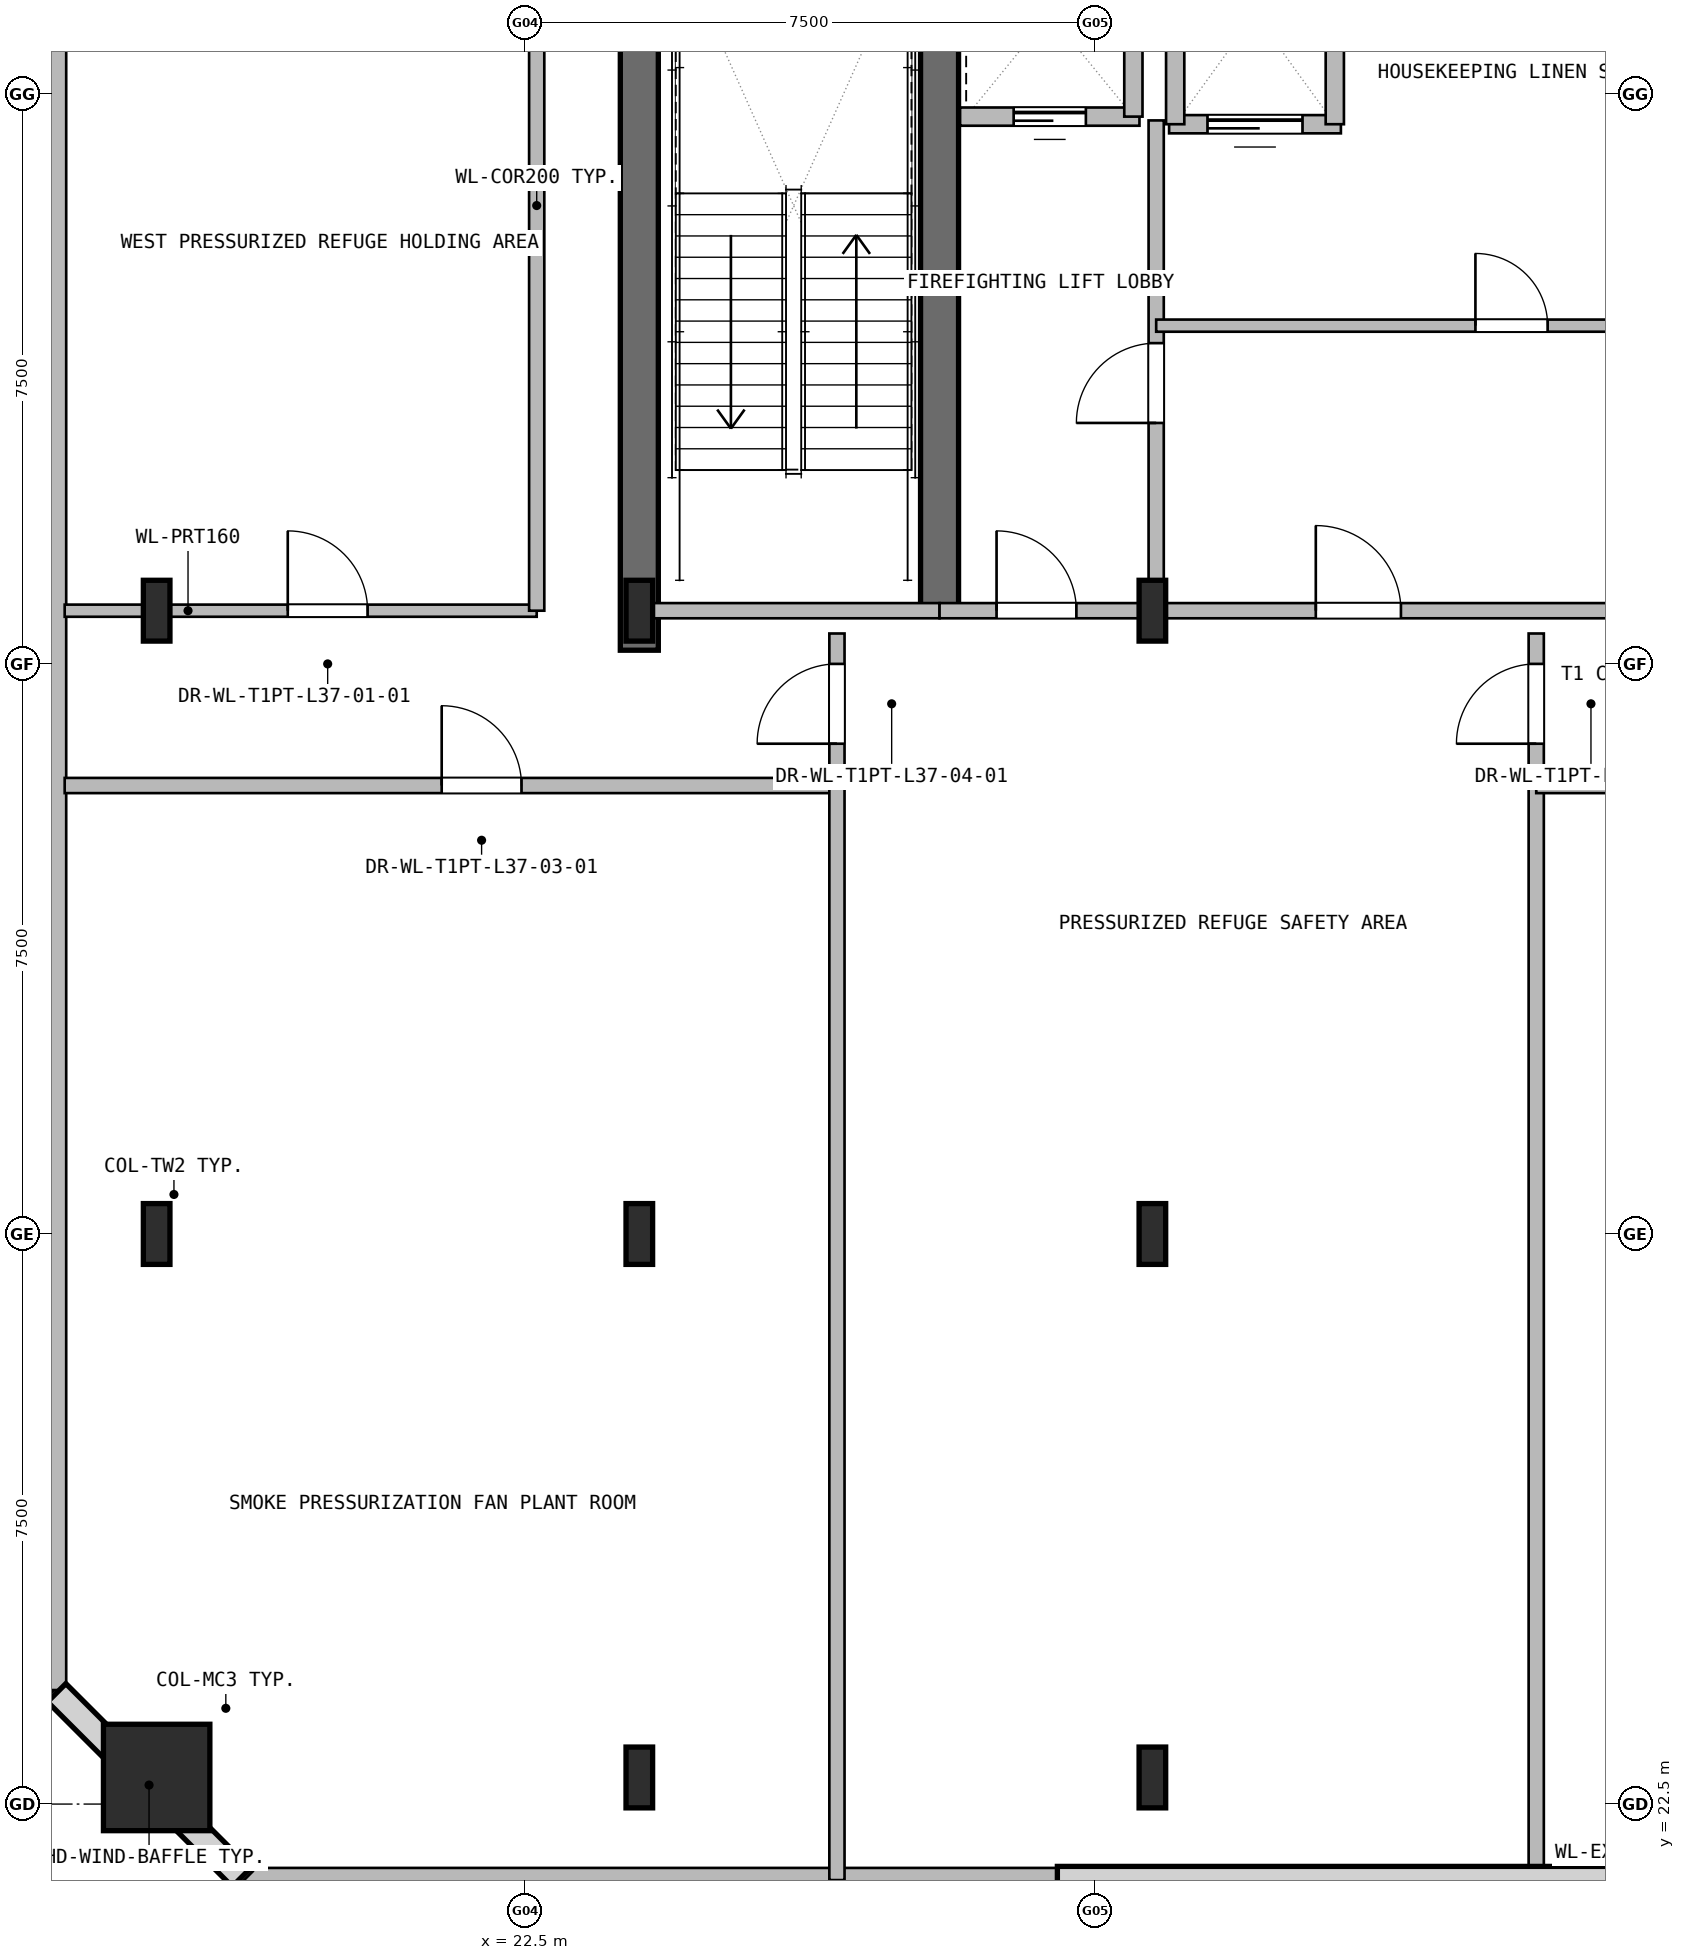
"""IFC4 building model, lengths in metres.
Left out: names, types, materials, properties, quantities, classifications, styles, units other than length and angle.
Written with IfcOpenShell. Run it as: python <this file> out.ifc"""

import sys

from ifc_helpers import new_model, si_unit, direction, frame, frame_2d, origin, origin_2d, place, context, subcontext, project, spatial, rectangle, hollow_rectangle, i_section, extrude, element, fill, save


model = new_model("IFC4")
c1 = context("Model", 3, precision=1e-05, world=origin(), true_north=direction((0.0, 1.0)))
c2 = subcontext(c1, "Body", "Model", "MODEL_VIEW")
j1 = project(units=[si_unit("LENGTHUNIT", "METRE"), si_unit("PLANEANGLEUNIT", "RADIAN")], contexts=[c1])
p1 = place(None, origin())
s1 = spatial("IfcSite", under=j1, at=p1, CompositionType="ELEMENT")
p2 = place(p1, origin())
s2 = spatial("IfcBuilding", under=s1, at=p2, CompositionType="ELEMENT")
p3 = place(p2, frame((0.0, 0.0, 138.0)))
s3 = spatial("IfcBuildingStorey", under=s2, at=p3, CompositionType="ELEMENT", Elevation=138.0)
p4 = place(p3, frame((24.0, 37.68, 0.0), z_axis=(0.0, 0.0, 1.0), x_axis=(0.0, 1.0, 0.0)))
e1 = element("IfcWall", 1, at=p4, inside=s3, PredefinedType="SHEAR", context=c2, shape_type="SweptSolid", body=[
    extrude(rectangle(XDim=10.32, YDim=0.5, at=frame_2d((5.16, 0.0))), origin(), (0.0, 0.0, 1.0), 4.8),
])
p5 = place(p3, frame((27.95, 38.2, 0.0), z_axis=(0.0, 0.0, 1.0), x_axis=(0.0, 1.0, 0.0)))
e2 = element("IfcWall", 2, at=p5, inside=s3, PredefinedType="SHEAR", context=c2, shape_type="SweptSolid", body=[
    extrude(rectangle(XDim=9.8, YDim=0.5, at=frame_2d((4.9, 0.0))), origin(), (0.0, 0.0, 1.0), 4.8),
])
p6 = place(p3, frame((17.65, 22.85, 0.0), z_axis=(0.0, 0.0, 1.0), x_axis=(1.0, 0.0, 0.0)))
e3 = element("IfcColumn", 3, at=p6, inside=s3, PredefinedType="COLUMN", context=c2, shape_type="SweptSolid", body=[
    extrude(hollow_rectangle(XDim=1.4, YDim=1.4, WallThickness=0.036, at=origin_2d()), origin(), (0.0, 0.0, 1.0), 4.8),
])
for number, where, z_axis, x_axis in (
    (4, (17.65, 30.0, 0.0), (0.0, 0.0, 1.0), (1.0, 0.0, 0.0)),
    (5, (17.65, 38.2, 0.0), (0.0, 0.0, 1.0), (1.0, 0.0, 0.0)),
    (6, (24.0, 22.85, 0.0), (0.0, 0.0, 1.0), (1.0, 0.0, 0.0)),
    (7, (24.0, 30.0, 0.0), (0.0, 0.0, 1.0), (1.0, 0.0, 0.0)),
    (8, (24.0, 38.2, 0.0), (0.0, 0.0, 1.0), (1.0, 0.0, 0.0)),
    (9, (30.75, 22.85, 0.0), (0.0, 0.0, 1.0), (1.0, 0.0, 0.0)),
    (10, (30.75, 30.0, 0.0), (0.0, 0.0, 1.0), (1.0, 0.0, 0.0)),
    (11, (30.75, 38.2, 0.0), (0.0, 0.0, 1.0), (1.0, 0.0, 0.0)),
):
    element("IfcColumn", number, at=place(p3, frame(where, z_axis=z_axis, x_axis=x_axis)), inside=s3, PredefinedType="COLUMN", context=c2, shape_type="SweptSolid", body=[
        extrude(i_section(OverallWidth=0.35, OverallDepth=0.8, WebThickness=0.018, FlangeThickness=0.032, at=origin_2d()), origin(), (0.0, 0.0, 1.0), 4.8),
    ])
p7 = place(p3, frame((56.2, 21.5, 0.0), z_axis=(0.0, 0.0, 1.0), x_axis=(-1.0, 0.0, 0.0)))
e12 = element("IfcWall", 12, at=p7, inside=s3, PredefinedType="SOLIDWALL", context=c2, shape_type="SweptSolid", body=[
    extrude(rectangle(XDim=37.4, YDim=0.32, at=frame_2d((18.7, 0.0))), origin(), (0.0, 0.0, 1.0), 4.53),
])
p8 = place(p3, frame((18.8, 21.5, 0.0), z_axis=(0.0, 0.0, 1.0), x_axis=(-0.707106781187, 0.707106781187, 0.0)))
e13 = element("IfcWall", 13, at=p8, inside=s3, PredefinedType="SOLIDWALL", context=c2, shape_type="SweptSolid", body=[
    extrude(rectangle(XDim=3.536, YDim=0.32, at=frame_2d((1.768, 0.0))), origin(), (0.0, 0.0, 1.0), 4.53),
])
p9 = place(p3, frame((16.3, 24.0, 0.0), z_axis=(0.0, 0.0, 1.0), x_axis=(0.0, 1.0, 0.0)))
e14 = element("IfcWall", 14, at=p9, inside=s3, PredefinedType="SOLIDWALL", context=c2, shape_type="SweptSolid", body=[
    extrude(rectangle(XDim=22.5, YDim=0.32, at=frame_2d((11.25, 0.0))), origin(), (0.0, 0.0, 1.0), 4.53),
])
p10 = place(p3, frame((24.0, 38.2, 0.0), z_axis=(0.0, 0.0, 1.0), x_axis=(1.0, 0.0, 0.0)))
e15 = element("IfcWall", 15, at=p10, inside=s3, PredefinedType="PARTITIONING", context=c2, shape_type="SweptSolid", body=[
    extrude(rectangle(XDim=3.95, YDim=0.2, at=frame_2d((1.975, 0.0))), origin(), (0.0, 0.0, 1.0), 3.88),
])
p11 = place(p3, frame((30.8, 38.2, 0.0), z_axis=(0.0, 0.0, 1.0), x_axis=(0.0, 1.0, 0.0)))
e16 = element("IfcWall", 16, at=p11, inside=s3, PredefinedType="PARTITIONING", context=c2, shape_type="SweptSolid", body=[
    extrude(rectangle(XDim=6.45, YDim=0.2, at=frame_2d((3.225, 0.0))), origin(), (0.0, 0.0, 1.0), 3.88),
])
p12 = place(p11, frame((2.47, 0.0, 0.0)))
e17 = element("IfcOpeningElement", 17, at=p12, cuts=e16, PredefinedType="OPENING", context=c2, shape_type="SweptSolid", body=[
    extrude(rectangle(XDim=1.05, YDim=2.1, at=frame_2d((0.525, 1.05))), frame((0.0, 0.11, 0.0), z_axis=(0.0, -1.0, 0.0), x_axis=(1.0, 0.0, 0.0)), (0.0, 0.0, 1.0), 0.22),
])
p13 = place(p3, frame((27.95, 38.2, 0.0), z_axis=(0.0, 0.0, 1.0), x_axis=(1.0, 0.0, 0.0)))
e18 = element("IfcWall", 18, at=p13, inside=s3, PredefinedType="PARTITIONING", context=c2, shape_type="SweptSolid", body=[
    extrude(rectangle(XDim=2.85, YDim=0.2, at=frame_2d((1.425, 0.0))), origin(), (0.0, 0.0, 1.0), 3.88),
])
p14 = place(p13, frame((0.75, 0.0, 0.0)))
e19 = element("IfcOpeningElement", 19, at=p14, cuts=e18, PredefinedType="OPENING", context=c2, shape_type="SweptSolid", body=[
    extrude(rectangle(XDim=1.05, YDim=2.1, at=frame_2d((0.525, 1.05))), frame((0.0, 0.11, 0.0), z_axis=(0.0, -1.0, 0.0), x_axis=(1.0, 0.0, 0.0)), (0.0, 0.0, 1.0), 0.22),
])
p15 = place(p3, frame((30.8, 38.2, 0.0), z_axis=(0.0, 0.0, 1.0), x_axis=(1.0, 0.0, 0.0)))
e20 = element("IfcWall", 20, at=p15, inside=s3, PredefinedType="PARTITIONING", context=c2, shape_type="SweptSolid", body=[
    extrude(rectangle(XDim=16.35, YDim=0.2, at=frame_2d((8.175, 0.0))), origin(), (0.0, 0.0, 1.0), 3.88),
])
p16 = place(p15, frame((2.1, 0.0, 0.0)))
e21 = element("IfcOpeningElement", 21, at=p16, cuts=e20, PredefinedType="OPENING", context=c2, shape_type="SweptSolid", body=[
    extrude(rectangle(XDim=1.12, YDim=2.1, at=frame_2d((0.56, 1.05))), frame((0.0, 0.11, 0.0), z_axis=(0.0, -1.0, 0.0), x_axis=(1.0, 0.0, 0.0)), (0.0, 0.0, 1.0), 0.22),
])
p17 = place(p15, frame((7.95, 0.0, 0.0)))
e22 = element("IfcOpeningElement", 22, at=p17, cuts=e20, PredefinedType="OPENING", context=c2, shape_type="SweptSolid", body=[
    extrude(rectangle(XDim=1.12, YDim=2.1, at=frame_2d((0.56, 1.05))), frame((0.0, 0.11, 0.0), z_axis=(0.0, -1.0, 0.0), x_axis=(1.0, 0.0, 0.0)), (0.0, 0.0, 1.0), 0.22),
])
p18 = place(p3, frame((28.22, 44.7, 0.0), z_axis=(0.0, 0.0, 1.0), x_axis=(1.0, 0.0, 0.0)))
e23 = element("IfcWall", 23, at=p18, inside=s3, PredefinedType="PARTITIONING", context=c2, shape_type="SweptSolid", body=[
    extrude(rectangle(XDim=2.36, YDim=0.24, at=frame_2d((1.18, 0.0))), origin(), (0.0, 0.0, 1.0), 4.53),
])
p19 = place(p18, frame((0.705, 0.0, 0.0)))
e24 = element("IfcOpeningElement", 24, at=p19, cuts=e23, PredefinedType="OPENING", context=c2, shape_type="SweptSolid", body=[
    extrude(rectangle(XDim=0.95, YDim=2.15, at=frame_2d((0.475, 1.075))), frame((0.0, 0.13, 0.0), z_axis=(0.0, -1.0, 0.0), x_axis=(1.0, 0.0, 0.0)), (0.0, 0.0, 1.0), 0.26),
])
p20 = place(p3, frame((30.5, 44.7, 0.0), z_axis=(0.0, 0.0, 1.0), x_axis=(0.0, 1.0, 0.0)))
e25 = element("IfcWall", 25, at=p20, inside=s3, PredefinedType="PARTITIONING", context=c2, shape_type="SweptSolid", body=[
    extrude(rectangle(XDim=2.7, YDim=0.24, at=frame_2d((1.35, 0.0))), origin(), (0.0, 0.0, 1.0), 3.88),
])
p21 = place(p3, frame((30.97, 44.6, 0.0), z_axis=(0.0, 0.0, 1.0), x_axis=(1.0, 0.0, 0.0)))
e26 = element("IfcWall", 26, at=p21, inside=s3, PredefinedType="PARTITIONING", context=c2, shape_type="SweptSolid", body=[
    extrude(rectangle(XDim=2.26, YDim=0.24, at=frame_2d((1.13, 0.0))), origin(), (0.0, 0.0, 1.0), 4.53),
])
p22 = place(p21, frame((0.505, 0.0, 0.0)))
e27 = element("IfcOpeningElement", 27, at=p22, cuts=e26, PredefinedType="OPENING", context=c2, shape_type="SweptSolid", body=[
    extrude(rectangle(XDim=1.25, YDim=2.2, at=frame_2d((0.625, 1.1))), frame((0.0, 0.13, 0.0), z_axis=(0.0, -1.0, 0.0), x_axis=(1.0, 0.0, 0.0)), (0.0, 0.0, 1.0), 0.26),
])
for number, where, z_axis, x_axis in (
    (28, (31.05, 44.6, 0.0), (0.0, 0.0, 1.0), (0.0, 1.0, 0.0)),
    (29, (33.15, 44.6, 0.0), (0.0, 0.0, 1.0), (0.0, 1.0, 0.0)),
):
    element("IfcWall", number, at=place(p3, frame(where, z_axis=z_axis, x_axis=x_axis)), inside=s3, PredefinedType="PARTITIONING", context=c2, shape_type="SweptSolid", body=[
        extrude(rectangle(XDim=2.9, YDim=0.24, at=frame_2d((1.45, 0.0))), origin(), (0.0, 0.0, 1.0), 4.53),
    ])
p23 = place(p3, frame((30.8, 41.95, 0.0), z_axis=(0.0, 0.0, 1.0), x_axis=(1.0, 0.0, 0.0)))
e30 = element("IfcWall", 30, at=p23, inside=s3, PredefinedType="PARTITIONING", context=c2, shape_type="SweptSolid", body=[
    extrude(rectangle(XDim=6.95, YDim=0.16, at=frame_2d((3.475, 0.0))), origin(), (0.0, 0.0, 1.0), 4.53),
])
p24 = place(p23, frame((4.2, 0.0, 0.0)))
e31 = element("IfcOpeningElement", 31, at=p24, cuts=e30, PredefinedType="OPENING", context=c2, shape_type="SweptSolid", body=[
    extrude(rectangle(XDim=0.95, YDim=2.1, at=frame_2d((0.475, 1.05))), frame((0.0, 0.09, 0.0), z_axis=(0.0, -1.0, 0.0), x_axis=(1.0, 0.0, 0.0)), (0.0, 0.0, 1.0), 0.18),
])
p25 = place(p3, frame((16.44, 38.2, 0.0), z_axis=(0.0, 0.0, 1.0), x_axis=(1.0, 0.0, 0.0)))
e32 = element("IfcWall", 32, at=p25, inside=s3, PredefinedType="PARTITIONING", context=c2, shape_type="SweptSolid", body=[
    extrude(rectangle(XDim=6.21, YDim=0.16, at=frame_2d((3.105, 0.0))), origin(), (0.0, 0.0, 1.0), 3.88),
])
p26 = place(p25, frame((2.935, 0.0, 0.0)))
e33 = element("IfcOpeningElement", 33, at=p26, cuts=e32, PredefinedType="OPENING", context=c2, shape_type="SweptSolid", body=[
    extrude(rectangle(XDim=1.05, YDim=2.1, at=frame_2d((0.525, 1.05))), frame((0.0, 0.09, 0.0), z_axis=(0.0, -1.0, 0.0), x_axis=(1.0, 0.0, 0.0)), (0.0, 0.0, 1.0), 0.18),
])
p27 = place(p3, frame((22.65, 38.2, 0.0), z_axis=(0.0, 0.0, 1.0), x_axis=(0.0, 1.0, 0.0)))
e34 = element("IfcWall", 34, at=p27, inside=s3, PredefinedType="PARTITIONING", context=c2, shape_type="SweptSolid", body=[
    extrude(rectangle(XDim=10.66, YDim=0.2, at=frame_2d((5.33, 0.0))), origin(), (0.0, 0.0, 1.0), 4.53),
])
p28 = place(p3, frame((16.44, 35.9, 0.0), z_axis=(0.0, 0.0, 1.0), x_axis=(1.0, 0.0, 0.0)))
e35 = element("IfcWall", 35, at=p28, inside=s3, PredefinedType="PARTITIONING", context=c2, shape_type="SweptSolid", body=[
    extrude(rectangle(XDim=10.16, YDim=0.2, at=frame_2d((5.08, 0.0))), origin(), (0.0, 0.0, 1.0), 4.53),
])
p29 = place(p28, frame((4.96, 0.0, 0.0)))
e36 = element("IfcOpeningElement", 36, at=p29, cuts=e35, PredefinedType="OPENING", context=c2, shape_type="SweptSolid", body=[
    extrude(rectangle(XDim=1.05, YDim=2.1, at=frame_2d((0.525, 1.05))), frame((0.0, 0.11, 0.0), z_axis=(0.0, -1.0, 0.0), x_axis=(1.0, 0.0, 0.0)), (0.0, 0.0, 1.0), 0.22),
])
p30 = place(p3, frame((26.6, 21.5, 0.0), z_axis=(0.0, 0.0, 1.0), x_axis=(0.0, 1.0, 0.0)))
e37 = element("IfcWall", 37, at=p30, inside=s3, PredefinedType="PARTITIONING", context=c2, shape_type="SweptSolid", body=[
    extrude(rectangle(XDim=16.4, YDim=0.2, at=frame_2d((8.2, 0.0))), origin(), (0.0, 0.0, 1.0), 4.53),
])
p31 = place(p30, frame((14.95, 0.0, 0.0)))
e38 = element("IfcOpeningElement", 38, at=p31, cuts=e37, PredefinedType="OPENING", context=c2, shape_type="SweptSolid", body=[
    extrude(rectangle(XDim=1.05, YDim=2.1, at=frame_2d((0.525, 1.05))), frame((0.0, 0.11, 0.0), z_axis=(0.0, -1.0, 0.0), x_axis=(1.0, 0.0, 0.0)), (0.0, 0.0, 1.0), 0.22),
])
p32 = place(p3, frame((35.8, 21.5, 0.0), z_axis=(0.0, 0.0, 1.0), x_axis=(0.0, 1.0, 0.0)))
e39 = element("IfcWall", 39, at=p32, inside=s3, PredefinedType="PARTITIONING", context=c2, shape_type="SweptSolid", body=[
    extrude(rectangle(XDim=16.4, YDim=0.2, at=frame_2d((8.2, 0.0))), origin(), (0.0, 0.0, 1.0), 4.53),
])
p33 = place(p32, frame((14.95, 0.0, 0.0)))
e40 = element("IfcOpeningElement", 40, at=p33, cuts=e39, PredefinedType="OPENING", context=c2, shape_type="SweptSolid", body=[
    extrude(rectangle(XDim=1.05, YDim=2.1, at=frame_2d((0.525, 1.05))), frame((0.0, 0.11, 0.0), z_axis=(0.0, -1.0, 0.0), x_axis=(1.0, 0.0, 0.0)), (0.0, 0.0, 1.0), 0.22),
])
p34 = place(p3, frame((35.8, 35.9, 0.0), z_axis=(0.0, 0.0, 1.0), x_axis=(1.0, 0.0, 0.0)))
e41 = element("IfcWall", 41, at=p34, inside=s3, PredefinedType="PARTITIONING", context=c2, shape_type="SweptSolid", body=[
    extrude(rectangle(XDim=13.85, YDim=0.2, at=frame_2d((6.925, 0.0))), origin(), (0.0, 0.0, 1.0), 4.53),
])
p35 = place(p34, frame((2.9, 0.0, 0.0)))
e42 = element("IfcOpeningElement", 42, at=p35, cuts=e41, PredefinedType="OPENING", context=c2, shape_type="SweptSolid", body=[
    extrude(rectangle(XDim=1.05, YDim=2.1, at=frame_2d((0.525, 1.05))), frame((0.0, 0.11, 0.0), z_axis=(0.0, -1.0, 0.0), x_axis=(1.0, 0.0, 0.0)), (0.0, 0.0, 1.0), 0.22),
])
p36 = place(p34, frame((9.825, 0.0, 0.0)))
e43 = element("IfcOpeningElement", 43, at=p36, cuts=e41, PredefinedType="OPENING", context=c2, shape_type="SweptSolid", body=[
    extrude(rectangle(XDim=1.05, YDim=2.1, at=frame_2d((0.525, 1.05))), frame((0.0, 0.11, 0.0), z_axis=(0.0, -1.0, 0.0), x_axis=(1.0, 0.0, 0.0)), (0.0, 0.0, 1.0), 0.22),
])
p37 = place(p12, origin())
e44 = element("IfcDoor", 44, at=p37, inside=s3, OperationType="SINGLE_SWING_LEFT", PredefinedType="DOOR", context=c2, shape_type="SweptSolid", body=[
    extrude(rectangle(XDim=1.05, YDim=2.1, at=frame_2d((0.525, 1.05))), frame((0.0, 0.025, 0.0), z_axis=(0.0, -1.0, 0.0), x_axis=(1.0, 0.0, 0.0)), (0.0, 0.0, 1.0), 0.05),
])
fill(e17, e44)
p38 = place(p14, origin())
e45 = element("IfcDoor", 45, at=p38, inside=s3, OperationType="SINGLE_SWING_RIGHT", PredefinedType="DOOR", context=c2, shape_type="SweptSolid", body=[
    extrude(rectangle(XDim=1.05, YDim=2.1, at=frame_2d((0.525, 1.05))), frame((0.0, 0.025, 0.0), z_axis=(0.0, -1.0, 0.0), x_axis=(1.0, 0.0, 0.0)), (0.0, 0.0, 1.0), 0.05),
])
fill(e19, e45)
p39 = place(p16, origin())
e46 = element("IfcDoor", 46, at=p39, inside=s3, OperationType="SINGLE_SWING_LEFT", PredefinedType="DOOR", context=c2, shape_type="SweptSolid", body=[
    extrude(rectangle(XDim=1.12, YDim=2.1, at=frame_2d((0.56, 1.05))), frame((0.0, 0.025, 0.0), z_axis=(0.0, -1.0, 0.0), x_axis=(1.0, 0.0, 0.0)), (0.0, 0.0, 1.0), 0.05),
])
fill(e21, e46)
p40 = place(p19, origin())
e47 = element("IfcDoor", 47, at=p40, inside=s3, OperationType="SLIDING_TO_LEFT", PredefinedType="DOOR", context=c2, shape_type="SweptSolid", body=[
    extrude(rectangle(XDim=0.95, YDim=2.15, at=frame_2d((0.475, 1.075))), frame((0.0, 0.025, 0.0), z_axis=(0.0, -1.0, 0.0), x_axis=(1.0, 0.0, 0.0)), (0.0, 0.0, 1.0), 0.05),
])
fill(e24, e47)
p41 = place(p22, origin())
e48 = element("IfcDoor", 48, at=p41, inside=s3, OperationType="SLIDING_TO_LEFT", PredefinedType="DOOR", context=c2, shape_type="SweptSolid", body=[
    extrude(rectangle(XDim=1.25, YDim=2.2, at=frame_2d((0.625, 1.1))), frame((0.0, 0.025, 0.0), z_axis=(0.0, -1.0, 0.0), x_axis=(1.0, 0.0, 0.0)), (0.0, 0.0, 1.0), 0.05),
])
fill(e27, e48)
p42 = place(p24, origin())
e49 = element("IfcDoor", 49, at=p42, inside=s3, OperationType="SINGLE_SWING_LEFT", PredefinedType="DOOR", context=c2, shape_type="SweptSolid", body=[
    extrude(rectangle(XDim=0.95, YDim=2.1, at=frame_2d((0.475, 1.05))), frame((0.0, 0.025, 0.0), z_axis=(0.0, -1.0, 0.0), x_axis=(1.0, 0.0, 0.0)), (0.0, 0.0, 1.0), 0.05),
])
fill(e31, e49)
p43 = place(p26, origin())
e50 = element("IfcDoor", 50, at=p43, inside=s3, OperationType="SINGLE_SWING_RIGHT", PredefinedType="DOOR", context=c2, shape_type="SweptSolid", body=[
    extrude(rectangle(XDim=1.05, YDim=2.1, at=frame_2d((0.525, 1.05))), frame((0.0, 0.025, 0.0), z_axis=(0.0, -1.0, 0.0), x_axis=(1.0, 0.0, 0.0)), (0.0, 0.0, 1.0), 0.05),
])
fill(e33, e50)
p44 = place(p29, origin())
e51 = element("IfcDoor", 51, at=p44, inside=s3, OperationType="SINGLE_SWING_LEFT", PredefinedType="DOOR", context=c2, shape_type="SweptSolid", body=[
    extrude(rectangle(XDim=1.05, YDim=2.1, at=frame_2d((0.525, 1.05))), frame((0.0, 0.025, 0.0), z_axis=(0.0, -1.0, 0.0), x_axis=(1.0, 0.0, 0.0)), (0.0, 0.0, 1.0), 0.05),
])
fill(e36, e51)
p45 = place(p31, origin())
e52 = element("IfcDoor", 52, at=p45, inside=s3, OperationType="SINGLE_SWING_RIGHT", PredefinedType="DOOR", context=c2, shape_type="SweptSolid", body=[
    extrude(rectangle(XDim=1.05, YDim=2.1, at=frame_2d((0.525, 1.05))), frame((0.0, 0.025, 0.0), z_axis=(0.0, -1.0, 0.0), x_axis=(1.0, 0.0, 0.0)), (0.0, 0.0, 1.0), 0.05),
])
fill(e38, e52)
p46 = place(p33, origin())
e53 = element("IfcDoor", 53, at=p46, inside=s3, OperationType="SINGLE_SWING_LEFT", PredefinedType="DOOR", context=c2, shape_type="SweptSolid", body=[
    extrude(rectangle(XDim=1.05, YDim=2.1, at=frame_2d((0.525, 1.05))), frame((0.0, 0.025, 0.0), z_axis=(0.0, -1.0, 0.0), x_axis=(1.0, 0.0, 0.0)), (0.0, 0.0, 1.0), 0.05),
])
fill(e40, e53)
save(model, sys.argv[1])
